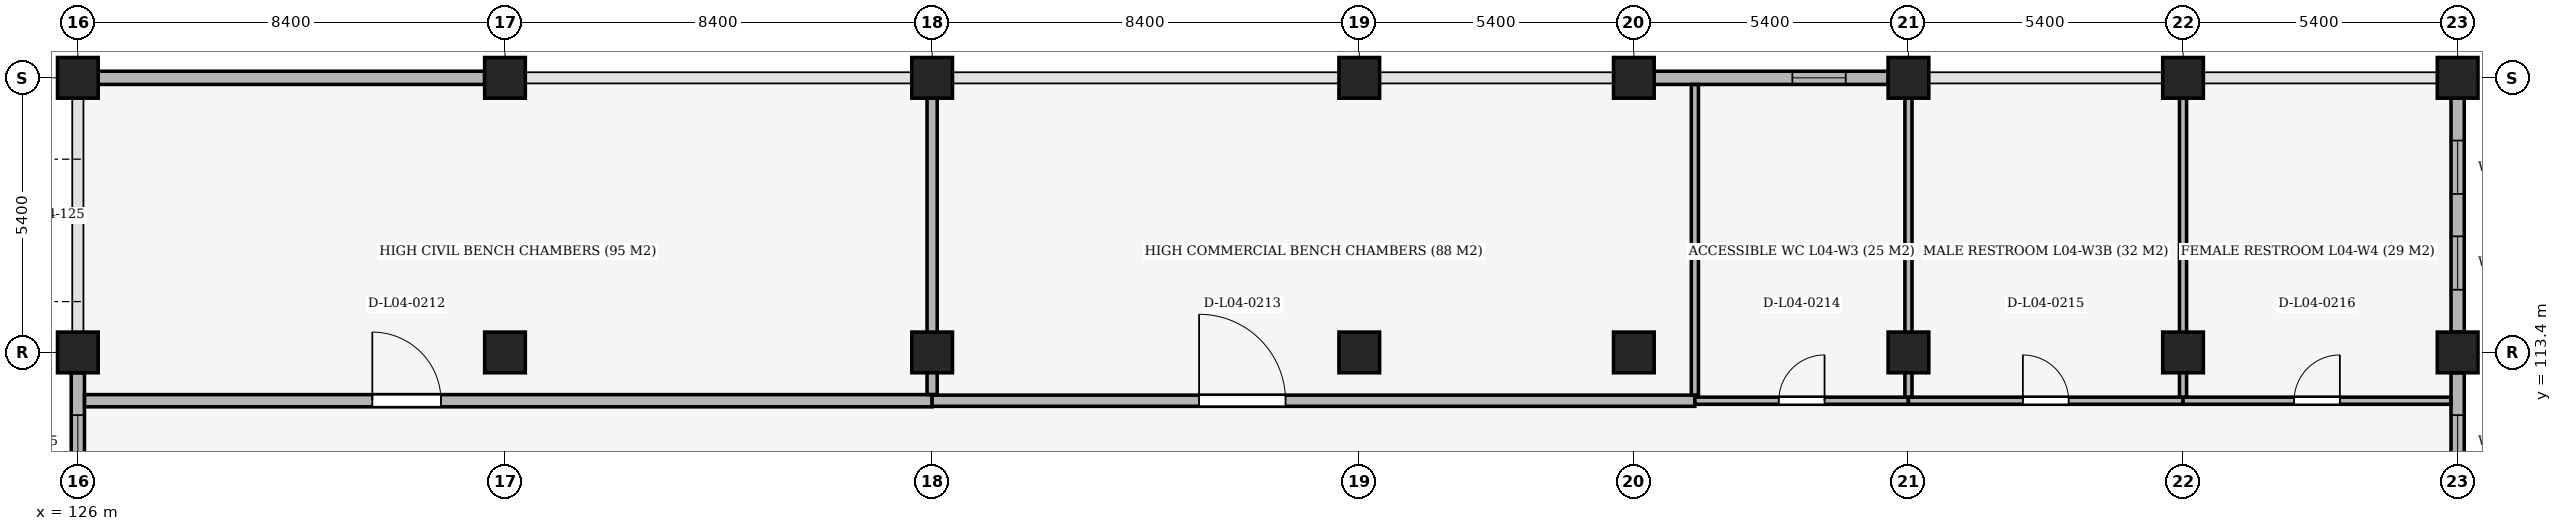
"""IFC4 building model, lengths in metres.
Left out: names, types, materials, properties, quantities, classifications, styles, units other than length and angle.
Written with IfcOpenShell. Run it as: python <this file> out.ifc"""

import sys

from ifc_helpers import new_model, si_unit, direction, frame, frame_2d, origin, origin_2d, place, context, subcontext, project, spatial, rectangle, extrude, element, fill, save


model = new_model("IFC4")
c1 = context("Model", 3, precision=1e-05, world=origin(), true_north=direction((0.0, 1.0)))
c2 = subcontext(c1, "Body", "Model", "MODEL_VIEW")
j1 = project(units=[si_unit("LENGTHUNIT", "METRE"), si_unit("PLANEANGLEUNIT", "RADIAN")], contexts=[c1])
p1 = place(None, origin())
s1 = spatial("IfcSite", under=j1, at=p1, CompositionType="ELEMENT")
p2 = place(p1, origin())
s2 = spatial("IfcBuilding", under=s1, at=p2, CompositionType="ELEMENT")
p3 = place(p2, frame((0.0, 0.0, 20.4)))
s3 = spatial("IfcBuildingStorey", under=s2, at=p3, CompositionType="ELEMENT", Elevation=20.4)
for number, where, z_axis, x_axis in (
    (1, (126.0, 113.4, 0.0), (0.0, 0.0, 1.0), (1.0, 0.0, 0.0)),
    (2, (126.0, 118.8, 0.0), (0.0, 0.0, 1.0), (1.0, 0.0, 0.0)),
    (3, (134.4, 113.4, 0.0), (0.0, 0.0, 1.0), (1.0, 0.0, 0.0)),
    (4, (134.4, 118.8, 0.0), (0.0, 0.0, 1.0), (1.0, 0.0, 0.0)),
    (5, (142.8, 113.4, 0.0), (0.0, 0.0, 1.0), (1.0, 0.0, 0.0)),
    (6, (142.8, 118.8, 0.0), (0.0, 0.0, 1.0), (1.0, 0.0, 0.0)),
    (7, (151.2, 113.4, 0.0), (0.0, 0.0, 1.0), (1.0, 0.0, 0.0)),
    (8, (151.2, 118.8, 0.0), (0.0, 0.0, 1.0), (1.0, 0.0, 0.0)),
    (9, (156.6, 113.4, 0.0), (0.0, 0.0, 1.0), (1.0, 0.0, 0.0)),
    (10, (156.6, 118.8, 0.0), (0.0, 0.0, 1.0), (1.0, 0.0, 0.0)),
    (11, (162.0, 113.4, 0.0), (0.0, 0.0, 1.0), (1.0, 0.0, 0.0)),
    (12, (162.0, 118.8, 0.0), (0.0, 0.0, 1.0), (1.0, 0.0, 0.0)),
    (13, (167.4, 113.4, 0.0), (0.0, 0.0, 1.0), (1.0, 0.0, 0.0)),
    (14, (167.4, 118.8, 0.0), (0.0, 0.0, 1.0), (1.0, 0.0, 0.0)),
    (15, (172.8, 113.4, 0.0), (0.0, 0.0, 1.0), (1.0, 0.0, 0.0)),
    (16, (172.8, 118.8, 0.0), (0.0, 0.0, 1.0), (1.0, 0.0, 0.0)),
):
    element("IfcColumn", number, at=place(p3, frame(where, z_axis=z_axis, x_axis=x_axis)), inside=s3, PredefinedType="COLUMN", context=c2, shape_type="SweptSolid", body=[
        extrude(rectangle(XDim=0.8, YDim=0.8, at=origin_2d()), origin(), (0.0, 0.0, 1.0), 4.8),
    ])
p4 = place(p3, frame((126.0, 108.4, 0.0), z_axis=(0.0, 0.0, 1.0), x_axis=(0.0, 1.0, 0.0)))
e17 = element("IfcWall", 17, at=p4, inside=s3, PredefinedType="SOLIDWALL", context=c2, shape_type="SweptSolid", body=[
    extrude(rectangle(XDim=4.6, YDim=0.26, at=frame_2d((2.3, 0.0))), origin(), (0.0, 0.0, 1.0), 4.0),
])
p5 = place(p4, frame((0.833, 0.0, 1.05)))
e18 = element("IfcOpeningElement", 18, at=p5, cuts=e17, PredefinedType="OPENING", context=c2, shape_type="SweptSolid", body=[
    extrude(rectangle(XDim=1.05, YDim=1.8, at=frame_2d((0.525, 0.9))), frame((0.0, 0.145, 0.0), z_axis=(0.0, -1.0, 0.0), x_axis=(1.0, 0.0, 0.0)), (0.0, 0.0, 1.0), 0.29),
])
p6 = place(p4, frame((2.717, 0.0, 1.05)))
e19 = element("IfcOpeningElement", 19, at=p6, cuts=e17, PredefinedType="OPENING", context=c2, shape_type="SweptSolid", body=[
    extrude(rectangle(XDim=1.05, YDim=1.8, at=frame_2d((0.525, 0.9))), frame((0.0, 0.145, 0.0), z_axis=(0.0, -1.0, 0.0), x_axis=(1.0, 0.0, 0.0)), (0.0, 0.0, 1.0), 0.29),
])
p7 = place(p3, frame((126.4, 118.8, 0.0), z_axis=(0.0, 0.0, 1.0), x_axis=(1.0, 0.0, 0.0)))
e20 = element("IfcWall", 20, at=p7, inside=s3, PredefinedType="SOLIDWALL", context=c2, shape_type="SweptSolid", body=[
    extrude(rectangle(XDim=7.6, YDim=0.26, at=frame_2d((3.8, 0.0))), origin(), (0.0, 0.0, 1.0), 3.85),
])
p8 = place(p3, frame((157.0, 118.8, 0.0), z_axis=(0.0, 0.0, 1.0), x_axis=(1.0, 0.0, 0.0)))
e21 = element("IfcWall", 21, at=p8, inside=s3, PredefinedType="SOLIDWALL", context=c2, shape_type="SweptSolid", body=[
    extrude(rectangle(XDim=4.6, YDim=0.26, at=frame_2d((2.3, 0.0))), origin(), (0.0, 0.0, 1.0), 3.95),
])
p9 = place(p8, frame((2.717, 0.0, 1.05)))
e22 = element("IfcOpeningElement", 22, at=p9, cuts=e21, PredefinedType="OPENING", context=c2, shape_type="SweptSolid", body=[
    extrude(rectangle(XDim=1.05, YDim=1.8, at=frame_2d((0.525, 0.9))), frame((0.0, 0.145, 0.0), z_axis=(0.0, -1.0, 0.0), x_axis=(1.0, 0.0, 0.0)), (0.0, 0.0, 1.0), 0.29),
])
p10 = place(p3, frame((172.8, 118.4, 0.0), z_axis=(0.0, 0.0, 1.0), x_axis=(0.0, -1.0, 0.0)))
e23 = element("IfcWall", 23, at=p10, inside=s3, PredefinedType="SOLIDWALL", context=c2, shape_type="SweptSolid", body=[
    extrude(rectangle(XDim=4.6, YDim=0.26, at=frame_2d((2.3, 0.0))), origin(), (0.0, 0.0, 1.0), 4.0),
])
p11 = place(p10, frame((0.833, 0.0, 1.05)))
e24 = element("IfcOpeningElement", 24, at=p11, cuts=e23, PredefinedType="OPENING", context=c2, shape_type="SweptSolid", body=[
    extrude(rectangle(XDim=1.05, YDim=1.8, at=frame_2d((0.525, 0.9))), frame((0.0, 0.145, 0.0), z_axis=(0.0, -1.0, 0.0), x_axis=(1.0, 0.0, 0.0)), (0.0, 0.0, 1.0), 0.29),
])
p12 = place(p10, frame((2.717, 0.0, 1.05)))
e25 = element("IfcOpeningElement", 25, at=p12, cuts=e23, PredefinedType="OPENING", context=c2, shape_type="SweptSolid", body=[
    extrude(rectangle(XDim=1.05, YDim=1.8, at=frame_2d((0.525, 0.9))), frame((0.0, 0.145, 0.0), z_axis=(0.0, -1.0, 0.0), x_axis=(1.0, 0.0, 0.0)), (0.0, 0.0, 1.0), 0.29),
])
p13 = place(p3, frame((172.8, 113.0, 0.0), z_axis=(0.0, 0.0, 1.0), x_axis=(0.0, -1.0, 0.0)))
e26 = element("IfcWall", 26, at=p13, inside=s3, PredefinedType="SOLIDWALL", context=c2, shape_type="SweptSolid", body=[
    extrude(rectangle(XDim=4.6, YDim=0.26, at=frame_2d((2.3, 0.0))), origin(), (0.0, 0.0, 1.0), 4.0),
])
p14 = place(p13, frame((0.833, 0.0, 1.05)))
e27 = element("IfcOpeningElement", 27, at=p14, cuts=e26, PredefinedType="OPENING", context=c2, shape_type="SweptSolid", body=[
    extrude(rectangle(XDim=1.05, YDim=1.8, at=frame_2d((0.525, 0.9))), frame((0.0, 0.145, 0.0), z_axis=(0.0, -1.0, 0.0), x_axis=(1.0, 0.0, 0.0)), (0.0, 0.0, 1.0), 0.29),
])
p15 = place(p13, frame((2.717, 0.0, 1.05)))
e28 = element("IfcOpeningElement", 28, at=p15, cuts=e26, PredefinedType="OPENING", context=c2, shape_type="SweptSolid", body=[
    extrude(rectangle(XDim=1.05, YDim=1.8, at=frame_2d((0.525, 0.9))), frame((0.0, 0.145, 0.0), z_axis=(0.0, -1.0, 0.0), x_axis=(1.0, 0.0, 0.0)), (0.0, 0.0, 1.0), 0.29),
])
p16 = place(p3, frame((126.132, 112.45, 0.0), z_axis=(0.0, 0.0, 1.0), x_axis=(1.0, 0.0, 0.0)))
e29 = element("IfcWall", 29, at=p16, inside=s3, PredefinedType="PARTITIONING", context=c2, shape_type="SweptSolid", body=[
    extrude(rectangle(XDim=16.668, YDim=0.24, at=frame_2d((8.334, 0.0))), origin(), (0.0, 0.0, 1.0), 4.0),
])
p17 = place(p16, frame((5.659, 0.0, 0.0)))
e30 = element("IfcOpeningElement", 30, at=p17, cuts=e29, PredefinedType="OPENING", context=c2, shape_type="SweptSolid", body=[
    extrude(rectangle(XDim=1.35, YDim=2.2, at=frame_2d((0.675, 1.1))), frame((0.0, 0.135, 0.0), z_axis=(0.0, -1.0, 0.0), x_axis=(1.0, 0.0, 0.0)), (0.0, 0.0, 1.0), 0.27),
])
p18 = place(p3, frame((142.8, 112.45, 0.0), z_axis=(0.0, 0.0, 1.0), x_axis=(1.0, 0.0, 0.0)))
e31 = element("IfcWall", 31, at=p18, inside=s3, PredefinedType="PARTITIONING", context=c2, shape_type="SweptSolid", body=[
    extrude(rectangle(XDim=15.0, YDim=0.22, at=frame_2d((7.5, 0.0))), origin(), (0.0, 0.0, 1.0), 4.0),
])
p19 = place(p18, frame((5.25, 0.0, 0.0)))
e32 = element("IfcOpeningElement", 32, at=p19, cuts=e31, PredefinedType="OPENING", context=c2, shape_type="SweptSolid", body=[
    extrude(rectangle(XDim=1.7, YDim=2.35, at=frame_2d((0.85, 1.175))), frame((0.0, 0.125, 0.0), z_axis=(0.0, -1.0, 0.0), x_axis=(1.0, 0.0, 0.0)), (0.0, 0.0, 1.0), 0.25),
])
p20 = place(p3, frame((157.8, 112.45, 0.0), z_axis=(0.0, 0.0, 1.0), x_axis=(1.0, 0.0, 0.0)))
e33 = element("IfcWall", 33, at=p20, inside=s3, PredefinedType="PARTITIONING", context=c2, shape_type="SweptSolid", body=[
    extrude(rectangle(XDim=4.2, YDim=0.14, at=frame_2d((2.1, 0.0))), origin(), (0.0, 0.0, 1.0), 4.0),
])
p21 = place(p20, frame((1.65, 0.0, 0.0)))
e34 = element("IfcOpeningElement", 34, at=p21, cuts=e33, PredefinedType="OPENING", context=c2, shape_type="SweptSolid", body=[
    extrude(rectangle(XDim=0.9, YDim=2.1, at=frame_2d((0.45, 1.05))), frame((0.0, 0.085, 0.0), z_axis=(0.0, -1.0, 0.0), x_axis=(1.0, 0.0, 0.0)), (0.0, 0.0, 1.0), 0.17),
])
p22 = place(p3, frame((162.0, 112.45, 0.0), z_axis=(0.0, 0.0, 1.0), x_axis=(1.0, 0.0, 0.0)))
e35 = element("IfcWall", 35, at=p22, inside=s3, PredefinedType="PARTITIONING", context=c2, shape_type="SweptSolid", body=[
    extrude(rectangle(XDim=5.4, YDim=0.14, at=frame_2d((2.7, 0.0))), origin(), (0.0, 0.0, 1.0), 4.0),
])
p23 = place(p22, frame((2.25, 0.0, 0.0)))
e36 = element("IfcOpeningElement", 36, at=p23, cuts=e35, PredefinedType="OPENING", context=c2, shape_type="SweptSolid", body=[
    extrude(rectangle(XDim=0.9, YDim=2.1, at=frame_2d((0.45, 1.05))), frame((0.0, 0.085, 0.0), z_axis=(0.0, -1.0, 0.0), x_axis=(1.0, 0.0, 0.0)), (0.0, 0.0, 1.0), 0.17),
])
p24 = place(p3, frame((167.4, 112.45, 0.0), z_axis=(0.0, 0.0, 1.0), x_axis=(1.0, 0.0, 0.0)))
e37 = element("IfcWall", 37, at=p24, inside=s3, PredefinedType="PARTITIONING", context=c2, shape_type="SweptSolid", body=[
    extrude(rectangle(XDim=5.268, YDim=0.14, at=frame_2d((2.634, 0.0))), origin(), (0.0, 0.0, 1.0), 4.0),
])
p25 = place(p24, frame((2.184, 0.0, 0.0)))
e38 = element("IfcOpeningElement", 38, at=p25, cuts=e37, PredefinedType="OPENING", context=c2, shape_type="SweptSolid", body=[
    extrude(rectangle(XDim=0.9, YDim=2.1, at=frame_2d((0.45, 1.05))), frame((0.0, 0.085, 0.0), z_axis=(0.0, -1.0, 0.0), x_axis=(1.0, 0.0, 0.0)), (0.0, 0.0, 1.0), 0.17),
])
p26 = place(p3, frame((142.8, 112.572, 0.0), z_axis=(0.0, 0.0, 1.0), x_axis=(0.0, 1.0, 0.0)))
e39 = element("IfcWall", 39, at=p26, inside=s3, PredefinedType="PARTITIONING", context=c2, shape_type="SweptSolid", body=[
    extrude(rectangle(XDim=6.263, YDim=0.2, at=frame_2d((3.131, 0.0))), origin(), (0.0, 0.0, 1.0), 4.0),
])
p27 = place(p3, frame((157.8, 112.562, 0.0), z_axis=(0.0, 0.0, 1.0), x_axis=(0.0, 1.0, 0.0)))
e40 = element("IfcWall", 40, at=p27, inside=s3, PredefinedType="PARTITIONING", context=c2, shape_type="SweptSolid", body=[
    extrude(rectangle(XDim=6.106, YDim=0.14, at=frame_2d((3.053, 0.0))), origin(), (0.0, 0.0, 1.0), 3.95),
])
p28 = place(p3, frame((162.0, 112.522, 0.0), z_axis=(0.0, 0.0, 1.0), x_axis=(0.0, 1.0, 0.0)))
e41 = element("IfcWall", 41, at=p28, inside=s3, PredefinedType="PARTITIONING", context=c2, shape_type="SweptSolid", body=[
    extrude(rectangle(XDim=6.293, YDim=0.14, at=frame_2d((3.146, 0.0))), origin(), (0.0, 0.0, 1.0), 4.0),
])
p29 = place(p3, frame((167.4, 112.522, 0.0), z_axis=(0.0, 0.0, 1.0), x_axis=(0.0, 1.0, 0.0)))
e42 = element("IfcWall", 42, at=p29, inside=s3, PredefinedType="PARTITIONING", context=c2, shape_type="SweptSolid", body=[
    extrude(rectangle(XDim=6.313, YDim=0.14, at=frame_2d((3.156, 0.0))), origin(), (0.0, 0.0, 1.0), 4.0),
])
p30 = place(p6, origin())
e43 = element("IfcWindow", 43, at=p30, inside=s3, PartitioningType="SINGLE_PANEL", PredefinedType="WINDOW", context=c2, shape_type="SweptSolid", body=[
    extrude(rectangle(XDim=1.05, YDim=1.8, at=frame_2d((0.525, 0.9))), frame((0.0, 0.03, 0.0), z_axis=(0.0, -1.0, 0.0), x_axis=(1.0, 0.0, 0.0)), (0.0, 0.0, 1.0), 0.06),
])
fill(e19, e43)
p31 = place(p9, origin())
e44 = element("IfcWindow", 44, at=p31, inside=s3, PartitioningType="SINGLE_PANEL", PredefinedType="WINDOW", context=c2, shape_type="SweptSolid", body=[
    extrude(rectangle(XDim=1.05, YDim=1.8, at=frame_2d((0.525, 0.9))), frame((0.0, 0.03, 0.0), z_axis=(0.0, -1.0, 0.0), x_axis=(1.0, 0.0, 0.0)), (0.0, 0.0, 1.0), 0.06),
])
fill(e22, e44)
p32 = place(p11, origin())
e45 = element("IfcWindow", 45, at=p32, inside=s3, PartitioningType="SINGLE_PANEL", PredefinedType="WINDOW", context=c2, shape_type="SweptSolid", body=[
    extrude(rectangle(XDim=1.05, YDim=1.8, at=frame_2d((0.525, 0.9))), frame((0.0, 0.03, 0.0), z_axis=(0.0, -1.0, 0.0), x_axis=(1.0, 0.0, 0.0)), (0.0, 0.0, 1.0), 0.06),
])
fill(e24, e45)
p33 = place(p12, origin())
e46 = element("IfcWindow", 46, at=p33, inside=s3, PartitioningType="SINGLE_PANEL", PredefinedType="WINDOW", context=c2, shape_type="SweptSolid", body=[
    extrude(rectangle(XDim=1.05, YDim=1.8, at=frame_2d((0.525, 0.9))), frame((0.0, 0.03, 0.0), z_axis=(0.0, -1.0, 0.0), x_axis=(1.0, 0.0, 0.0)), (0.0, 0.0, 1.0), 0.06),
])
fill(e25, e46)
p34 = place(p14, origin())
e47 = element("IfcWindow", 47, at=p34, inside=s3, PartitioningType="SINGLE_PANEL", PredefinedType="WINDOW", context=c2, shape_type="SweptSolid", body=[
    extrude(rectangle(XDim=1.05, YDim=1.8, at=frame_2d((0.525, 0.9))), frame((0.0, 0.03, 0.0), z_axis=(0.0, -1.0, 0.0), x_axis=(1.0, 0.0, 0.0)), (0.0, 0.0, 1.0), 0.06),
])
fill(e27, e47)
p35 = place(p17, origin())
e48 = element("IfcDoor", 48, at=p35, inside=s3, OperationType="SINGLE_SWING_LEFT", PredefinedType="DOOR", context=c2, shape_type="SweptSolid", body=[
    extrude(rectangle(XDim=1.35, YDim=2.2, at=frame_2d((0.675, 1.1))), frame((0.0, 0.025, 0.0), z_axis=(0.0, -1.0, 0.0), x_axis=(1.0, 0.0, 0.0)), (0.0, 0.0, 1.0), 0.05),
])
fill(e30, e48)
p36 = place(p19, origin())
e49 = element("IfcDoor", 49, at=p36, inside=s3, OperationType="SINGLE_SWING_LEFT", PredefinedType="DOOR", context=c2, shape_type="SweptSolid", body=[
    extrude(rectangle(XDim=1.7, YDim=2.35, at=frame_2d((0.85, 1.175))), frame((0.0, 0.025, 0.0), z_axis=(0.0, -1.0, 0.0), x_axis=(1.0, 0.0, 0.0)), (0.0, 0.0, 1.0), 0.05),
])
fill(e32, e49)
p37 = place(p21, origin())
e50 = element("IfcDoor", 50, at=p37, inside=s3, OperationType="SINGLE_SWING_RIGHT", PredefinedType="DOOR", context=c2, shape_type="SweptSolid", body=[
    extrude(rectangle(XDim=0.9, YDim=2.1, at=frame_2d((0.45, 1.05))), frame((0.0, 0.025, 0.0), z_axis=(0.0, -1.0, 0.0), x_axis=(1.0, 0.0, 0.0)), (0.0, 0.0, 1.0), 0.05),
])
fill(e34, e50)
p38 = place(p23, origin())
e51 = element("IfcDoor", 51, at=p38, inside=s3, OperationType="SINGLE_SWING_LEFT", PredefinedType="DOOR", context=c2, shape_type="SweptSolid", body=[
    extrude(rectangle(XDim=0.9, YDim=2.1, at=frame_2d((0.45, 1.05))), frame((0.0, 0.025, 0.0), z_axis=(0.0, -1.0, 0.0), x_axis=(1.0, 0.0, 0.0)), (0.0, 0.0, 1.0), 0.05),
])
fill(e36, e51)
p39 = place(p25, origin())
e52 = element("IfcDoor", 52, at=p39, inside=s3, OperationType="SINGLE_SWING_RIGHT", PredefinedType="DOOR", context=c2, shape_type="SweptSolid", body=[
    extrude(rectangle(XDim=0.9, YDim=2.1, at=frame_2d((0.45, 1.05))), frame((0.0, 0.025, 0.0), z_axis=(0.0, -1.0, 0.0), x_axis=(1.0, 0.0, 0.0)), (0.0, 0.0, 1.0), 0.05),
])
fill(e38, e52)
save(model, sys.argv[1])
